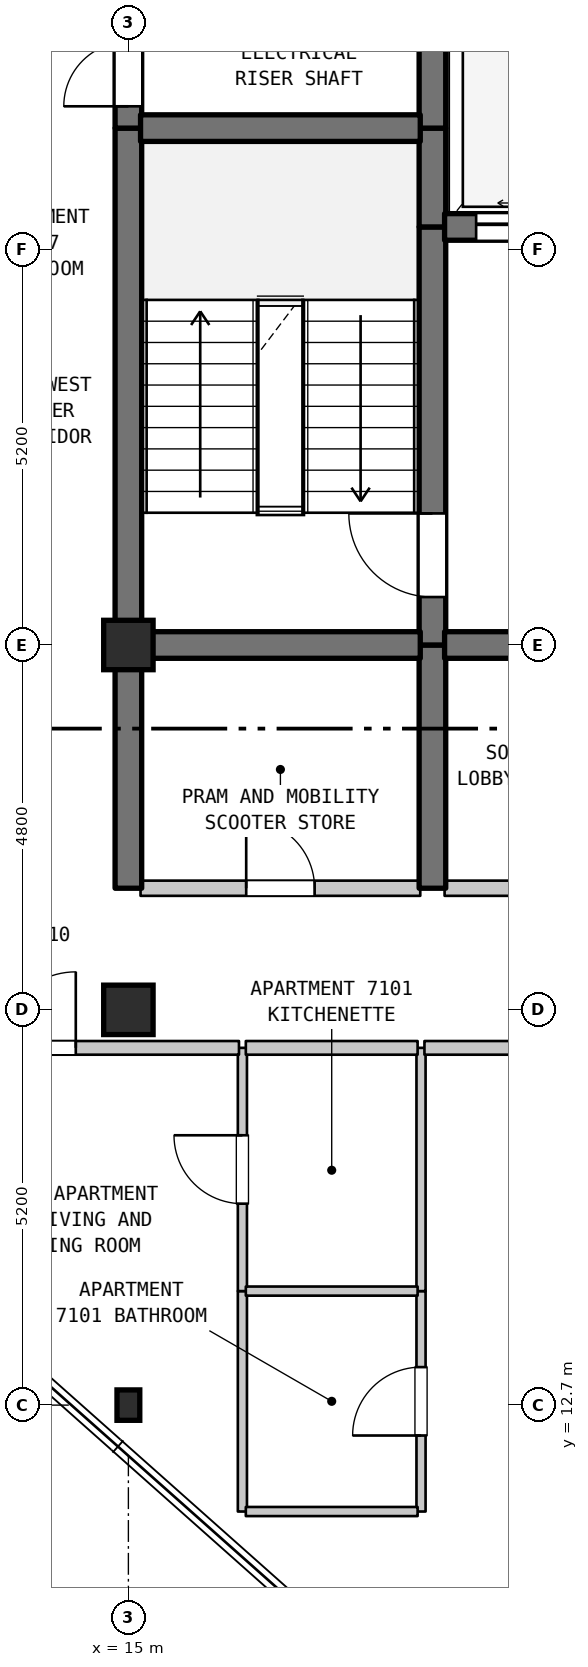
"""IFC4 building model, lengths in metres.
Left out: names, types, materials, properties, quantities, classifications, styles, units other than length and angle.
Written with IfcOpenShell. Run it as: python <this file> out.ifc"""

import sys

from ifc_helpers import new_model, si_unit, direction, frame, frame_2d, origin, origin_2d, place, context, subcontext, project, spatial, rectangle, i_section, extrude, element, fill, save


model = new_model("IFC4")
c1 = context("Model", 3, precision=1e-05, world=origin(), true_north=direction((0.0, 1.0)))
c2 = subcontext(c1, "Body", "Model", "MODEL_VIEW")
j1 = project(units=[si_unit("LENGTHUNIT", "METRE"), si_unit("PLANEANGLEUNIT", "RADIAN")], contexts=[c1])
p1 = place(None, origin())
s1 = spatial("IfcSite", under=j1, at=p1, CompositionType="ELEMENT")
p2 = place(p1, origin())
s2 = spatial("IfcBuilding", under=s1, at=p2, CompositionType="ELEMENT")
p3 = place(p2, frame((0.0, 0.0, 284.3)))
s3 = spatial("IfcBuildingStorey", under=s2, at=p3, CompositionType="ELEMENT", Elevation=284.3)
p4 = place(p3, frame((15.0, 12.7, 0.0), z_axis=(0.0, 0.0, 1.0), x_axis=(1.0, 0.0, 0.0)))
e1 = element("IfcColumn", 1, at=p4, inside=s3, PredefinedType="COLUMN", context=c2, shape_type="SweptSolid", body=[
    extrude(i_section(OverallWidth=0.3, OverallDepth=0.4, WebThickness=0.013, FlangeThickness=0.024, FilletRadius=0.027, at=origin_2d()), origin(), (0.0, 0.0, 1.0), 3.7),
])
for number, where, z_axis, x_axis in (
    (2, (15.0, 17.9, 0.0), (0.0, 0.0, 1.0), (1.0, 0.0, 0.0)),
    (3, (15.0, 22.7, 0.0), (0.0, 0.0, 1.0), (1.0, 0.0, 0.0)),
):
    element("IfcColumn", number, at=place(p3, frame(where, z_axis=z_axis, x_axis=x_axis)), inside=s3, PredefinedType="COLUMN", context=c2, shape_type="SweptSolid", body=[
        extrude(rectangle(XDim=0.65, YDim=0.65, at=origin_2d()), origin(), (0.0, 0.0, 1.0), 3.7),
    ])
p5 = place(p3, frame((15.0, 19.5, 0.0), z_axis=(0.0, 0.0, 1.0), x_axis=(0.0, 1.0, 0.0)))
e4 = element("IfcWall", 4, at=p5, inside=s3, PredefinedType="SHEAR", context=c2, shape_type="SweptSolid", body=[
    extrude(rectangle(XDim=3.2, YDim=0.35, at=frame_2d((1.6, 0.0))), origin(), (0.0, 0.0, 1.0), 3.39),
])
p6 = place(p3, frame((15.0, 22.7, 0.0), z_axis=(0.0, 0.0, 1.0), x_axis=(0.0, 1.0, 0.0)))
e5 = element("IfcWall", 5, at=p6, inside=s3, PredefinedType="SHEAR", context=c2, shape_type="SweptSolid", body=[
    extrude(rectangle(XDim=6.8, YDim=0.35, at=frame_2d((3.4, 0.0))), origin(), (0.0, 0.0, 1.0), 3.39),
])
p7 = place(p3, frame((15.0, 29.5, 0.0), z_axis=(0.0, 0.0, 1.0), x_axis=(0.0, 1.0, 0.0)))
e6 = element("IfcWall", 6, at=p7, inside=s3, PredefinedType="SHEAR", context=c2, shape_type="SweptSolid", body=[
    extrude(rectangle(XDim=1.6, YDim=0.35, at=frame_2d((0.8, 0.0))), origin(), (0.0, 0.0, 1.0), 3.39),
])
p8 = place(p7, frame((0.287, 0.0, 0.0)))
e7 = element("IfcOpeningElement", 7, at=p8, cuts=e6, PredefinedType="OPENING", context=c2, shape_type="SweptSolid", body=[
    extrude(rectangle(XDim=0.85, YDim=2.1, at=frame_2d((0.425, 1.05))), frame((0.0, 0.185, 0.0), z_axis=(0.0, -1.0, 0.0), x_axis=(1.0, 0.0, 0.0)), (0.0, 0.0, 1.0), 0.37),
])
p9 = place(p3, frame((16.5, 11.3, 0.0), z_axis=(0.0, 0.0, 1.0), x_axis=(0.0, 1.0, 0.0)))
e8 = element("IfcWall", 8, at=p9, inside=s3, PredefinedType="PARTITIONING", context=c2, shape_type="SweptSolid", body=[
    extrude(rectangle(XDim=2.9, YDim=0.12, at=frame_2d((1.45, 0.0))), origin(), (0.0, 0.0, 1.0), 3.39),
])
p10 = place(p3, frame((16.5, 14.2, 0.0), z_axis=(0.0, 0.0, 1.0), x_axis=(0.0, 1.0, 0.0)))
e9 = element("IfcWall", 9, at=p10, inside=s3, PredefinedType="PARTITIONING", context=c2, shape_type="SweptSolid", body=[
    extrude(rectangle(XDim=3.2, YDim=0.12, at=frame_2d((1.6, 0.0))), origin(), (0.0, 0.0, 1.0), 3.39),
])
p11 = place(p10, frame((1.15, 0.0, 0.0)))
e10 = element("IfcOpeningElement", 10, at=p11, cuts=e9, PredefinedType="OPENING", context=c2, shape_type="SweptSolid", body=[
    extrude(rectangle(XDim=0.9, YDim=2.15, at=frame_2d((0.45, 1.075))), frame((0.0, 0.07, 0.0), z_axis=(0.0, -1.0, 0.0), x_axis=(1.0, 0.0, 0.0)), (0.0, 0.0, 1.0), 0.14),
])
p12 = place(p3, frame((18.85, 11.3, 0.0), z_axis=(0.0, 0.0, 1.0), x_axis=(0.0, 1.0, 0.0)))
e11 = element("IfcWall", 11, at=p12, inside=s3, PredefinedType="PARTITIONING", context=c2, shape_type="SweptSolid", body=[
    extrude(rectangle(XDim=2.9, YDim=0.12, at=frame_2d((1.45, 0.0))), origin(), (0.0, 0.0, 1.0), 3.39),
])
p13 = place(p12, frame((1.0, 0.0, 0.0)))
e12 = element("IfcOpeningElement", 12, at=p13, cuts=e11, PredefinedType="OPENING", context=c2, shape_type="SweptSolid", body=[
    extrude(rectangle(XDim=0.9, YDim=2.1, at=frame_2d((0.45, 1.05))), frame((0.0, 0.07, 0.0), z_axis=(0.0, -1.0, 0.0), x_axis=(1.0, 0.0, 0.0)), (0.0, 0.0, 1.0), 0.14),
])
p14 = place(p3, frame((18.85, 14.2, 0.0), z_axis=(0.0, 0.0, 1.0), x_axis=(0.0, 1.0, 0.0)))
e13 = element("IfcWall", 13, at=p14, inside=s3, PredefinedType="PARTITIONING", context=c2, shape_type="SweptSolid", body=[
    extrude(rectangle(XDim=3.2, YDim=0.12, at=frame_2d((1.6, 0.0))), origin(), (0.0, 0.0, 1.0), 3.39),
])
p15 = place(p3, frame((19.0, 19.5, 0.0), z_axis=(0.0, 0.0, 1.0), x_axis=(0.0, 1.0, 0.0)))
e14 = element("IfcWall", 14, at=p15, inside=s3, PredefinedType="SHEAR", context=c2, shape_type="SweptSolid", body=[
    extrude(rectangle(XDim=3.2, YDim=0.35, at=frame_2d((1.6, 0.0))), origin(), (0.0, 0.0, 1.0), 3.39),
])
p16 = place(p3, frame((19.0, 22.7, 0.0), z_axis=(0.0, 0.0, 1.0), x_axis=(0.0, 1.0, 0.0)))
e15 = element("IfcWall", 15, at=p16, inside=s3, PredefinedType="SHEAR", context=c2, shape_type="SweptSolid", body=[
    extrude(rectangle(XDim=5.5, YDim=0.35, at=frame_2d((2.75, 0.0))), origin(), (0.0, 0.0, 1.0), 3.39),
])
p17 = place(p16, frame((0.631, 0.0, 0.0)))
e16 = element("IfcOpeningElement", 16, at=p17, cuts=e15, PredefinedType="OPENING", context=c2, shape_type="SweptSolid", body=[
    extrude(rectangle(XDim=1.1, YDim=2.15, at=frame_2d((0.55, 1.075))), frame((0.0, 0.185, 0.0), z_axis=(0.0, -1.0, 0.0), x_axis=(1.0, 0.0, 0.0)), (0.0, 0.0, 1.0), 0.37),
])
p18 = place(p3, frame((19.0, 28.2, 0.0), z_axis=(0.0, 0.0, 1.0), x_axis=(0.0, 1.0, 0.0)))
e17 = element("IfcWall", 17, at=p18, inside=s3, PredefinedType="SHEAR", context=c2, shape_type="SweptSolid", body=[
    extrude(rectangle(XDim=1.3, YDim=0.35, at=frame_2d((0.65, 0.0))), origin(), (0.0, 0.0, 1.0), 3.39),
])
p19 = place(p3, frame((19.0, 29.5, 0.0), z_axis=(0.0, 0.0, 1.0), x_axis=(0.0, 1.0, 0.0)))
e18 = element("IfcWall", 18, at=p19, inside=s3, PredefinedType="SHEAR", context=c2, shape_type="SweptSolid", body=[
    extrude(rectangle(XDim=5.5, YDim=0.35, at=frame_2d((2.75, 0.0))), origin(), (0.0, 0.0, 1.0), 3.39),
])
p20 = place(p19, frame((2.025, 0.0, 0.0)))
e19 = element("IfcOpeningElement", 19, at=p20, cuts=e18, PredefinedType="OPENING", context=c2, shape_type="SweptSolid", body=[
    extrude(rectangle(XDim=1.1, YDim=2.15, at=frame_2d((0.55, 1.075))), frame((0.0, 0.185, 0.0), z_axis=(0.0, -1.0, 0.0), x_axis=(1.0, 0.0, 0.0)), (0.0, 0.0, 1.0), 0.37),
])
for number, where, z_axis, x_axis in (
    (20, (16.545, 11.3, 0.0), (0.0, 0.0, 1.0), (1.0, 0.0, 0.0)),
    (21, (16.545, 14.2, 0.0), (0.0, 0.0, 1.0), (1.0, 0.0, 0.0)),
):
    element("IfcWall", number, at=place(p3, frame(where, z_axis=z_axis, x_axis=x_axis)), inside=s3, PredefinedType="PARTITIONING", context=c2, shape_type="SweptSolid", body=[
        extrude(rectangle(XDim=2.26, YDim=0.12, at=frame_2d((1.13, 0.0))), origin(), (0.0, 0.0, 1.0), 3.39),
    ])
p21 = place(p3, frame((12.975, 17.4, 0.0), z_axis=(0.0, 0.0, 1.0), x_axis=(1.0, 0.0, 0.0)))
e22 = element("IfcWall", 22, at=p21, inside=s3, PredefinedType="STANDARD", context=c2, shape_type="SweptSolid", body=[
    extrude(rectangle(XDim=3.48, YDim=0.18, at=frame_2d((1.74, 0.0))), origin(), (0.0, 0.0, 1.0), 3.39),
])
p22 = place(p21, frame((0.333, 0.0, 0.0)))
e23 = element("IfcOpeningElement", 23, at=p22, cuts=e22, PredefinedType="OPENING", context=c2, shape_type="SweptSolid", body=[
    extrude(rectangle(XDim=1.0, YDim=2.15, at=frame_2d((0.5, 1.075))), frame((0.0, 0.1, 0.0), z_axis=(0.0, -1.0, 0.0), x_axis=(1.0, 0.0, 0.0)), (0.0, 0.0, 1.0), 0.2),
])
p23 = place(p3, frame((16.545, 17.4, 0.0), z_axis=(0.0, 0.0, 1.0), x_axis=(1.0, 0.0, 0.0)))
e24 = element("IfcWall", 24, at=p23, inside=s3, PredefinedType="STANDARD", context=c2, shape_type="SweptSolid", body=[
    extrude(rectangle(XDim=2.26, YDim=0.18, at=frame_2d((1.13, 0.0))), origin(), (0.0, 0.0, 1.0), 3.39),
])
p24 = place(p3, frame((18.895, 17.4, 0.0), z_axis=(0.0, 0.0, 1.0), x_axis=(1.0, 0.0, 0.0)))
e25 = element("IfcWall", 25, at=p24, inside=s3, PredefinedType="STANDARD", context=c2, shape_type="SweptSolid", body=[
    extrude(rectangle(XDim=1.86, YDim=0.18, at=frame_2d((0.93, 0.0))), origin(), (0.0, 0.0, 1.0), 3.39),
])
p25 = place(p3, frame((15.16, 19.5, 0.0), z_axis=(0.0, 0.0, 1.0), x_axis=(1.0, 0.0, 0.0)))
e26 = element("IfcWall", 26, at=p25, inside=s3, PredefinedType="STANDARD", context=c2, shape_type="SweptSolid", body=[
    extrude(rectangle(XDim=3.68, YDim=0.2, at=frame_2d((1.84, 0.0))), origin(), (0.0, 0.0, 1.0), 3.39),
])
p26 = place(p25, frame((1.39, 0.0, 0.0)))
e27 = element("IfcOpeningElement", 27, at=p26, cuts=e26, PredefinedType="OPENING", context=c2, shape_type="SweptSolid", body=[
    extrude(rectangle(XDim=0.9, YDim=2.15, at=frame_2d((0.45, 1.075))), frame((0.0, 0.11, 0.0), z_axis=(0.0, -1.0, 0.0), x_axis=(1.0, 0.0, 0.0)), (0.0, 0.0, 1.0), 0.22),
])
p27 = place(p3, frame((19.16, 19.5, 0.0), z_axis=(0.0, 0.0, 1.0), x_axis=(1.0, 0.0, 0.0)))
e28 = element("IfcWall", 28, at=p27, inside=s3, PredefinedType="STANDARD", context=c2, shape_type="SweptSolid", body=[
    extrude(rectangle(XDim=4.48, YDim=0.2, at=frame_2d((2.24, 0.0))), origin(), (0.0, 0.0, 1.0), 3.39),
])
p28 = place(p27, frame((1.64, 0.0, 0.0)))
e29 = element("IfcOpeningElement", 29, at=p28, cuts=e28, PredefinedType="OPENING", context=c2, shape_type="SweptSolid", body=[
    extrude(rectangle(XDim=1.2, YDim=2.2, at=frame_2d((0.6, 1.1))), frame((0.0, 0.11, 0.0), z_axis=(0.0, -1.0, 0.0), x_axis=(1.0, 0.0, 0.0)), (0.0, 0.0, 1.0), 0.22),
])
p29 = place(p3, frame((15.16, 22.7, 0.0), z_axis=(0.0, 0.0, 1.0), x_axis=(1.0, 0.0, 0.0)))
e30 = element("IfcWall", 30, at=p29, inside=s3, PredefinedType="SHEAR", context=c2, shape_type="SweptSolid", body=[
    extrude(rectangle(XDim=3.68, YDim=0.35, at=frame_2d((1.84, 0.0))), origin(), (0.0, 0.0, 1.0), 3.39),
])
p30 = place(p3, frame((19.16, 22.7, 0.0), z_axis=(0.0, 0.0, 1.0), x_axis=(1.0, 0.0, 0.0)))
e31 = element("IfcWall", 31, at=p30, inside=s3, PredefinedType="SHEAR", context=c2, shape_type="SweptSolid", body=[
    extrude(rectangle(XDim=4.48, YDim=0.35, at=frame_2d((2.24, 0.0))), origin(), (0.0, 0.0, 1.0), 3.39),
])
p31 = place(p30, frame((1.64, 0.0, 0.0)))
e32 = element("IfcOpeningElement", 32, at=p31, cuts=e31, PredefinedType="OPENING", context=c2, shape_type="SweptSolid", body=[
    extrude(rectangle(XDim=1.2, YDim=2.2, at=frame_2d((0.6, 1.1))), frame((0.0, 0.185, 0.0), z_axis=(0.0, -1.0, 0.0), x_axis=(1.0, 0.0, 0.0)), (0.0, 0.0, 1.0), 0.37),
])
p32 = place(p3, frame((19.16, 28.2, 0.0), z_axis=(0.0, 0.0, 1.0), x_axis=(1.0, 0.0, 0.0)))
e33 = element("IfcWall", 33, at=p32, inside=s3, PredefinedType="SHEAR", context=c2, shape_type="SweptSolid", body=[
    extrude(rectangle(XDim=4.48, YDim=0.35, at=frame_2d((2.24, 0.0))), origin(), (0.0, 0.0, 1.0), 3.39),
])
p33 = place(p32, frame((0.415, 0.0, 0.0)))
e34 = element("IfcOpeningElement", 34, at=p33, cuts=e33, PredefinedType="OPENING", context=c2, shape_type="SweptSolid", body=[
    extrude(rectangle(XDim=1.25, YDim=2.2, at=frame_2d((0.625, 1.1))), frame((0.0, 0.185, 0.0), z_axis=(0.0, -1.0, 0.0), x_axis=(1.0, 0.0, 0.0)), (0.0, 0.0, 1.0), 0.37),
])
p34 = place(p32, frame((2.815, 0.0, 0.0)))
e35 = element("IfcOpeningElement", 35, at=p34, cuts=e33, PredefinedType="OPENING", context=c2, shape_type="SweptSolid", body=[
    extrude(rectangle(XDim=1.25, YDim=2.2, at=frame_2d((0.625, 1.1))), frame((0.0, 0.185, 0.0), z_axis=(0.0, -1.0, 0.0), x_axis=(1.0, 0.0, 0.0)), (0.0, 0.0, 1.0), 0.37),
])
p35 = place(p3, frame((15.16, 29.5, 0.0), z_axis=(0.0, 0.0, 1.0), x_axis=(1.0, 0.0, 0.0)))
e36 = element("IfcWall", 36, at=p35, inside=s3, PredefinedType="SHEAR", context=c2, shape_type="SweptSolid", body=[
    extrude(rectangle(XDim=3.68, YDim=0.35, at=frame_2d((1.84, 0.0))), origin(), (0.0, 0.0, 1.0), 3.39),
])
p36 = place(p8, origin())
e37 = element("IfcDoor", 37, at=p36, inside=s3, OperationType="SINGLE_SWING_LEFT", PredefinedType="DOOR", context=c2, shape_type="SweptSolid", body=[
    extrude(rectangle(XDim=0.85, YDim=2.1, at=frame_2d((0.425, 1.05))), frame((0.0, 0.025, 0.0), z_axis=(0.0, -1.0, 0.0), x_axis=(1.0, 0.0, 0.0)), (0.0, 0.0, 1.0), 0.05),
])
fill(e7, e37)
p37 = place(p11, origin())
e38 = element("IfcDoor", 38, at=p37, inside=s3, OperationType="SINGLE_SWING_RIGHT", PredefinedType="DOOR", context=c2, shape_type="SweptSolid", body=[
    extrude(rectangle(XDim=0.9, YDim=2.15, at=frame_2d((0.45, 1.075))), frame((0.0, 0.025, 0.0), z_axis=(0.0, -1.0, 0.0), x_axis=(1.0, 0.0, 0.0)), (0.0, 0.0, 1.0), 0.05),
])
fill(e10, e38)
p38 = place(p13, origin())
e39 = element("IfcDoor", 39, at=p38, inside=s3, OperationType="SINGLE_SWING_LEFT", PredefinedType="DOOR", context=c2, shape_type="SweptSolid", body=[
    extrude(rectangle(XDim=0.9, YDim=2.1, at=frame_2d((0.45, 1.05))), frame((0.0, 0.025, 0.0), z_axis=(0.0, -1.0, 0.0), x_axis=(1.0, 0.0, 0.0)), (0.0, 0.0, 1.0), 0.05),
])
fill(e12, e39)
p39 = place(p17, origin())
e40 = element("IfcDoor", 40, at=p39, inside=s3, OperationType="SINGLE_SWING_RIGHT", PredefinedType="DOOR", context=c2, shape_type="SweptSolid", body=[
    extrude(rectangle(XDim=1.1, YDim=2.15, at=frame_2d((0.55, 1.075))), frame((0.0, 0.025, 0.0), z_axis=(0.0, -1.0, 0.0), x_axis=(1.0, 0.0, 0.0)), (0.0, 0.0, 1.0), 0.05),
])
fill(e16, e40)
p40 = place(p22, origin())
e41 = element("IfcDoor", 41, at=p40, inside=s3, OperationType="SINGLE_SWING_RIGHT", PredefinedType="DOOR", context=c2, shape_type="SweptSolid", body=[
    extrude(rectangle(XDim=1.0, YDim=2.15, at=frame_2d((0.5, 1.075))), frame((0.0, 0.025, 0.0), z_axis=(0.0, -1.0, 0.0), x_axis=(1.0, 0.0, 0.0)), (0.0, 0.0, 1.0), 0.05),
])
fill(e23, e41)
p41 = place(p26, origin())
e42 = element("IfcDoor", 42, at=p41, inside=s3, OperationType="SINGLE_SWING_LEFT", PredefinedType="DOOR", context=c2, shape_type="SweptSolid", body=[
    extrude(rectangle(XDim=0.9, YDim=2.15, at=frame_2d((0.45, 1.075))), frame((0.0, 0.025, 0.0), z_axis=(0.0, -1.0, 0.0), x_axis=(1.0, 0.0, 0.0)), (0.0, 0.0, 1.0), 0.05),
])
fill(e27, e42)
p42 = place(p33, origin())
e43 = element("IfcDoor", 43, at=p42, inside=s3, OperationType="DOUBLE_DOOR_SLIDING", PredefinedType="DOOR", context=c2, shape_type="SweptSolid", body=[
    extrude(rectangle(XDim=1.25, YDim=2.2, at=frame_2d((0.625, 1.1))), frame((0.0, 0.025, 0.0), z_axis=(0.0, -1.0, 0.0), x_axis=(1.0, 0.0, 0.0)), (0.0, 0.0, 1.0), 0.05),
])
fill(e34, e43)
save(model, sys.argv[1])
